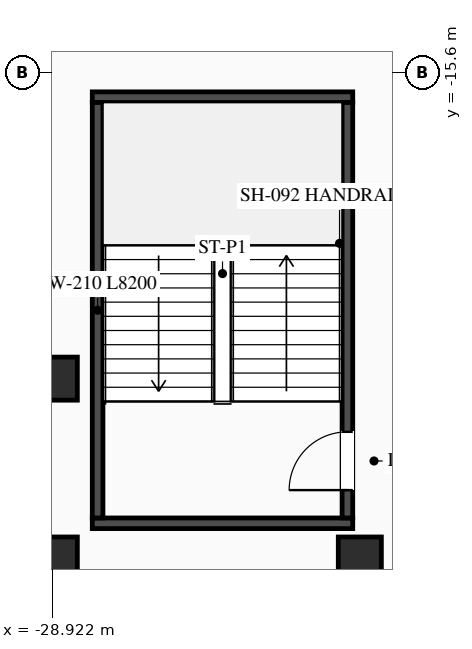
"""IFC4 building model, lengths in metres.
Left out: names, types, materials, properties, quantities, classifications, styles, units other than length and angle.
Written with IfcOpenShell. Run it as: python <this file> out.ifc"""

import sys

from ifc_helpers import new_model, si_unit, direction, frame, frame_2d, origin, origin_2d, place, context, subcontext, project, spatial, rectangle, i_section, extrude, element, fill, save


model = new_model("IFC4")
c1 = context("Model", 3, precision=1e-05, world=origin(), true_north=direction((0.0, 1.0)))
c2 = subcontext(c1, "Body", "Model", "MODEL_VIEW")
j1 = project(units=[si_unit("LENGTHUNIT", "METRE"), si_unit("PLANEANGLEUNIT", "RADIAN")], contexts=[c1])
p1 = place(None, origin())
s1 = spatial("IfcSite", under=j1, at=p1, CompositionType="ELEMENT")
p2 = place(p1, origin())
s2 = spatial("IfcBuilding", under=s1, at=p2, CompositionType="ELEMENT")
p3 = place(p2, frame((0.0, 0.0, 9.6)))
s3 = spatial("IfcBuildingStorey", under=s2, at=p3, CompositionType="ELEMENT", Elevation=9.6)
for number, where, z_axis, x_axis in (
    (1, (-28.13, -24.505, 0.0), (0.0, 0.0, 1.0), (1.0, 0.0, 0.0)),
    (2, (-28.13, -16.095, 0.0), (0.0, 0.0, 1.0), (1.0, 0.0, 0.0)),
):
    element("IfcWall", number, at=place(p3, frame(where, z_axis=z_axis, x_axis=x_axis)), inside=s3, PredefinedType="SHEAR", context=c2, shape_type="SweptSolid", body=[
        extrude(rectangle(XDim=5.14, YDim=0.21, at=frame_2d((2.57, 0.0))), origin(), (0.0, 0.0, 1.0), 4.25),
    ])
p4 = place(p3, frame((-28.025, -24.4, 0.0), z_axis=(0.0, 0.0, 1.0), x_axis=(0.0, 1.0, 0.0)))
e3 = element("IfcWall", 3, at=p4, inside=s3, PredefinedType="SHEAR", context=c2, shape_type="SweptSolid", body=[
    extrude(rectangle(XDim=8.2, YDim=0.21, at=frame_2d((4.1, 0.0))), origin(), (0.0, 0.0, 1.0), 4.25),
])
p5 = place(p3, frame((-23.095, -24.4, 0.0), z_axis=(0.0, 0.0, 1.0), x_axis=(0.0, 1.0, 0.0)))
e4 = element("IfcWall", 4, at=p5, inside=s3, PredefinedType="SHEAR", context=c2, shape_type="SweptSolid", body=[
    extrude(rectangle(XDim=8.2, YDim=0.21, at=frame_2d((4.1, 0.0))), origin(), (0.0, 0.0, 1.0), 4.25),
])
p6 = place(p5, frame((0.55, 0.0, 0.0)))
e5 = element("IfcOpeningElement", 5, at=p6, cuts=e4, PredefinedType="OPENING", context=c2, shape_type="SweptSolid", body=[
    extrude(rectangle(XDim=1.15, YDim=2.1, at=frame_2d((0.575, 1.05))), frame((0.0, 0.115, 0.0), z_axis=(0.0, -1.0, 0.0), x_axis=(1.0, 0.0, 0.0)), (0.0, 0.0, 1.0), 0.23),
])
for number, where, z_axis, x_axis in (
    (6, (-28.85, -21.65, 0.0), (0.0, 0.0, 1.0), (1.0, 0.0, 0.0)),
    (7, (-28.85, -25.2, 0.0), (0.0, 0.0, 1.0), (1.0, 0.0, 0.0)),
    (8, (-22.85, -25.2, 0.0), (0.0, 0.0, 1.0), (1.0, 0.0, 0.0)),
):
    element("IfcColumn", number, at=place(p3, frame(where, z_axis=z_axis, x_axis=x_axis)), inside=s3, PredefinedType="COLUMN", context=c2, shape_type="SweptSolid", body=[
        extrude(i_section(OverallWidth=0.85, OverallDepth=0.85, WebThickness=0.032, FlangeThickness=0.048, at=origin_2d()), origin(), (0.0, 0.0, 1.0), 4.5),
    ])
p7 = place(p6, origin())
e9 = element("IfcDoor", 9, at=p7, inside=s3, OperationType="SINGLE_SWING_LEFT", PredefinedType="DOOR", context=c2, shape_type="SweptSolid", body=[
    extrude(rectangle(XDim=1.15, YDim=2.1, at=frame_2d((0.575, 1.05))), frame((0.0, 0.025, 0.0), z_axis=(0.0, -1.0, 0.0), x_axis=(1.0, 0.0, 0.0)), (0.0, 0.0, 1.0), 0.05),
])
fill(e5, e9)
save(model, sys.argv[1])
